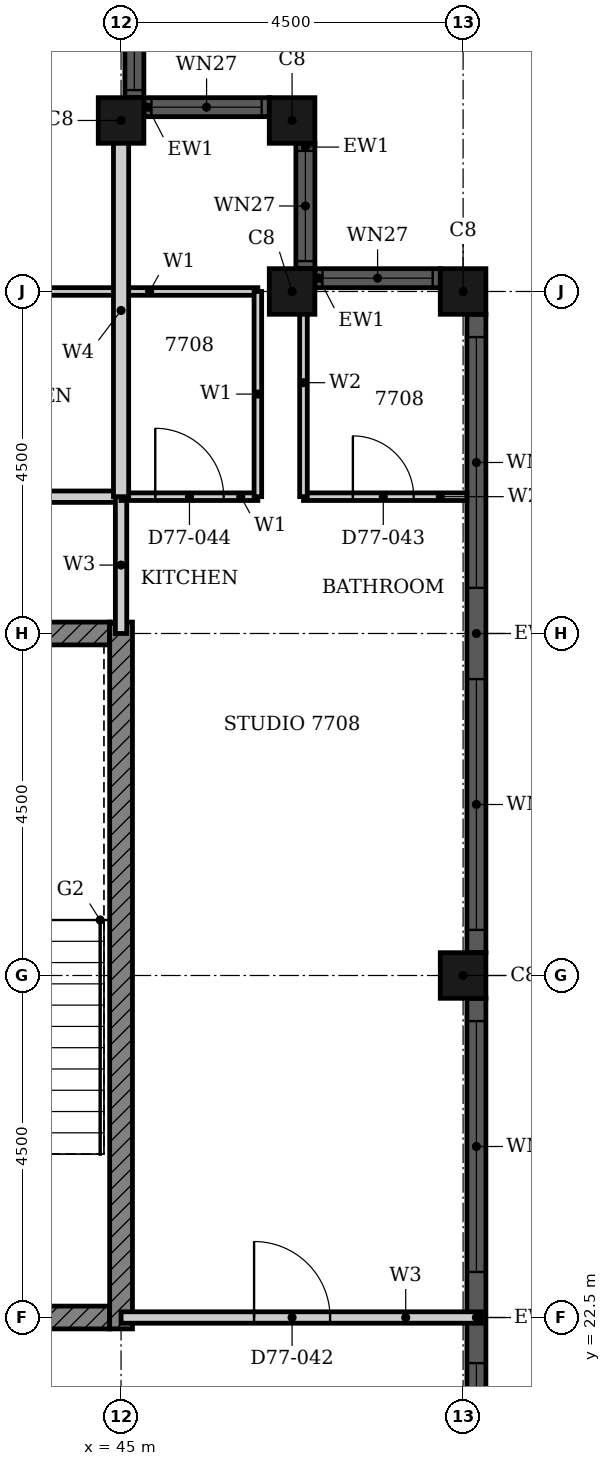
"""IFC4 building model, lengths in metres.
Left out: names, types, materials, properties, quantities, classifications, styles, units other than length and angle.
Written with IfcOpenShell. Run it as: python <this file> out.ifc"""

import sys

from ifc_helpers import new_model, si_unit, direction, frame, frame_2d, origin, origin_2d, place, context, subcontext, project, spatial, rectangle, hollow_rectangle, extrude, element, fill, save


model = new_model("IFC4")
c1 = context("Model", 3, precision=1e-05, world=origin(), true_north=direction((0.0, 1.0)))
c2 = subcontext(c1, "Body", "Model", "MODEL_VIEW")
j1 = project(units=[si_unit("LENGTHUNIT", "METRE"), si_unit("PLANEANGLEUNIT", "RADIAN")], contexts=[c1])
p1 = place(None, origin())
s1 = spatial("IfcSite", under=j1, at=p1, CompositionType="ELEMENT")
p2 = place(p1, origin())
s2 = spatial("IfcBuilding", under=s1, at=p2, CompositionType="ELEMENT")
p3 = place(p2, frame((0.0, 0.0, 301.9)))
s3 = spatial("IfcBuildingStorey", under=s2, at=p3, CompositionType="ELEMENT", Elevation=301.9)
for number, where, z_axis, x_axis in (
    (1, (49.5, 27.0, 0.0), (0.0, 0.0, 1.0), (1.0, 0.0, 0.0)),
    (2, (49.5, 36.0, 0.0), (0.0, 0.0, 1.0), (1.0, 0.0, 0.0)),
    (3, (47.25, 36.0, 0.0), (0.0, 0.0, 1.0), (1.0, 0.0, 0.0)),
    (4, (47.25, 38.25, 0.0), (0.0, 0.0, 1.0), (1.0, 0.0, 0.0)),
    (5, (45.0, 38.25, 0.0), (0.0, 0.0, 1.0), (1.0, 0.0, 0.0)),
):
    element("IfcColumn", number, at=place(p3, frame(where, z_axis=z_axis, x_axis=x_axis)), inside=s3, PredefinedType="COLUMN", context=c2, shape_type="SweptSolid", body=[
        extrude(hollow_rectangle(XDim=0.6, YDim=0.6, WallThickness=0.02, at=origin_2d()), origin(), (0.0, 0.0, 1.0), 3.7),
    ])
p4 = place(p3, frame((49.675, 18.3, 0.0), z_axis=(0.0, 0.0, 1.0), x_axis=(0.0, 1.0, 0.0)))
e6 = element("IfcWall", 6, at=p4, inside=s3, PredefinedType="SOLIDWALL", context=c2, shape_type="SweptSolid", body=[
    extrude(rectangle(XDim=8.4, YDim=0.25, at=frame_2d((4.2, 0.0))), origin(), (0.0, 0.0, 1.0), 3.7),
])
p5 = place(p4, frame((0.3, 0.0, 0.45)))
e7 = element("IfcOpeningElement", 7, at=p5, cuts=e6, PredefinedType="OPENING", context=c2, shape_type="SweptSolid", body=[
    extrude(rectangle(XDim=3.3, YDim=1.8, at=frame_2d((1.65, 0.9))), frame((0.0, 0.135, 0.0), z_axis=(0.0, -1.0, 0.0), x_axis=(1.0, 0.0, 0.0)), (0.0, 0.0, 1.0), 0.27),
])
p6 = place(p4, frame((4.8, 0.0, 0.45)))
e8 = element("IfcOpeningElement", 8, at=p6, cuts=e6, PredefinedType="OPENING", context=c2, shape_type="SweptSolid", body=[
    extrude(rectangle(XDim=3.3, YDim=1.8, at=frame_2d((1.65, 0.9))), frame((0.0, 0.135, 0.0), z_axis=(0.0, -1.0, 0.0), x_axis=(1.0, 0.0, 0.0)), (0.0, 0.0, 1.0), 0.27),
])
p7 = place(p3, frame((49.675, 27.3, 0.0), z_axis=(0.0, 0.0, 1.0), x_axis=(0.0, 1.0, 0.0)))
e9 = element("IfcWall", 9, at=p7, inside=s3, PredefinedType="SOLIDWALL", context=c2, shape_type="SweptSolid", body=[
    extrude(rectangle(XDim=8.4, YDim=0.25, at=frame_2d((4.2, 0.0))), origin(), (0.0, 0.0, 1.0), 3.7),
])
p8 = place(p7, frame((0.3, 0.0, 0.45)))
e10 = element("IfcOpeningElement", 10, at=p8, cuts=e9, PredefinedType="OPENING", context=c2, shape_type="SweptSolid", body=[
    extrude(rectangle(XDim=3.3, YDim=1.8, at=frame_2d((1.65, 0.9))), frame((0.0, 0.135, 0.0), z_axis=(0.0, -1.0, 0.0), x_axis=(1.0, 0.0, 0.0)), (0.0, 0.0, 1.0), 0.27),
])
p9 = place(p7, frame((4.8, 0.0, 0.45)))
e11 = element("IfcOpeningElement", 11, at=p9, cuts=e9, PredefinedType="OPENING", context=c2, shape_type="SweptSolid", body=[
    extrude(rectangle(XDim=3.3, YDim=1.8, at=frame_2d((1.65, 0.9))), frame((0.0, 0.135, 0.0), z_axis=(0.0, -1.0, 0.0), x_axis=(1.0, 0.0, 0.0)), (0.0, 0.0, 1.0), 0.27),
])
p10 = place(p3, frame((49.2, 36.175, 0.0), z_axis=(0.0, 0.0, 1.0), x_axis=(-1.0, 0.0, 0.0)))
e12 = element("IfcWall", 12, at=p10, inside=s3, PredefinedType="SOLIDWALL", context=c2, shape_type="SweptSolid", body=[
    extrude(rectangle(XDim=1.65, YDim=0.25, at=frame_2d((0.825, 0.0))), origin(), (0.0, 0.0, 1.0), 3.7),
])
p11 = place(p10, frame((0.1, 0.0, 0.9)))
e13 = element("IfcOpeningElement", 13, at=p11, cuts=e12, PredefinedType="OPENING", context=c2, shape_type="SweptSolid", body=[
    extrude(rectangle(XDim=1.45, YDim=1.35, at=frame_2d((0.725, 0.675))), frame((0.0, 0.135, 0.0), z_axis=(0.0, -1.0, 0.0), x_axis=(1.0, 0.0, 0.0)), (0.0, 0.0, 1.0), 0.27),
])
p12 = place(p3, frame((47.425, 36.3, 0.0), z_axis=(0.0, 0.0, 1.0), x_axis=(0.0, 1.0, 0.0)))
e14 = element("IfcWall", 14, at=p12, inside=s3, PredefinedType="SOLIDWALL", context=c2, shape_type="SweptSolid", body=[
    extrude(rectangle(XDim=1.65, YDim=0.25, at=frame_2d((0.825, 0.0))), origin(), (0.0, 0.0, 1.0), 3.7),
])
p13 = place(p12, frame((0.1, 0.0, 0.9)))
e15 = element("IfcOpeningElement", 15, at=p13, cuts=e14, PredefinedType="OPENING", context=c2, shape_type="SweptSolid", body=[
    extrude(rectangle(XDim=1.45, YDim=1.35, at=frame_2d((0.725, 0.675))), frame((0.0, 0.135, 0.0), z_axis=(0.0, -1.0, 0.0), x_axis=(1.0, 0.0, 0.0)), (0.0, 0.0, 1.0), 0.27),
])
p14 = place(p3, frame((46.95, 38.425, 0.0), z_axis=(0.0, 0.0, 1.0), x_axis=(-1.0, 0.0, 0.0)))
e16 = element("IfcWall", 16, at=p14, inside=s3, PredefinedType="SOLIDWALL", context=c2, shape_type="SweptSolid", body=[
    extrude(rectangle(XDim=1.65, YDim=0.25, at=frame_2d((0.825, 0.0))), origin(), (0.0, 0.0, 1.0), 3.7),
])
p15 = place(p14, frame((0.1, 0.0, 0.9)))
e17 = element("IfcOpeningElement", 17, at=p15, cuts=e16, PredefinedType="OPENING", context=c2, shape_type="SweptSolid", body=[
    extrude(rectangle(XDim=1.45, YDim=1.35, at=frame_2d((0.725, 0.675))), frame((0.0, 0.135, 0.0), z_axis=(0.0, -1.0, 0.0), x_axis=(1.0, 0.0, 0.0)), (0.0, 0.0, 1.0), 0.27),
])
p16 = place(p3, frame((45.175, 38.55, 0.0), z_axis=(0.0, 0.0, 1.0), x_axis=(0.0, 1.0, 0.0)))
e18 = element("IfcWall", 18, at=p16, inside=s3, PredefinedType="SOLIDWALL", context=c2, shape_type="SweptSolid", body=[
    extrude(rectangle(XDim=1.65, YDim=0.25, at=frame_2d((0.825, 0.0))), origin(), (0.0, 0.0, 1.0), 3.7),
])
p17 = place(p16, frame((0.1, 0.0, 0.9)))
e19 = element("IfcOpeningElement", 19, at=p17, cuts=e18, PredefinedType="OPENING", context=c2, shape_type="SweptSolid", body=[
    extrude(rectangle(XDim=1.45, YDim=1.35, at=frame_2d((0.725, 0.675))), frame((0.0, 0.135, 0.0), z_axis=(0.0, -1.0, 0.0), x_axis=(1.0, 0.0, 0.0)), (0.0, 0.0, 1.0), 0.27),
])
p18 = place(p3, frame((30.339, 22.5, 0.0), z_axis=(0.0, 0.0, 1.0), x_axis=(1.0, 0.0, 0.0)))
e20 = element("IfcWall", 20, at=p18, inside=s3, PredefinedType="SHEAR", context=c2, shape_type="SweptSolid", body=[
    extrude(rectangle(XDim=14.511, YDim=0.3, at=frame_2d((7.255, 0.0))), origin(), (0.0, 0.0, 1.0), 3.2),
])
p19 = place(p18, frame((7.975, 0.0, 0.0)))
e21 = element("IfcOpeningElement", 21, at=p19, cuts=e20, PredefinedType="OPENING", context=c2, shape_type="SweptSolid", body=[
    extrude(rectangle(XDim=1.8, YDim=2.1, at=frame_2d((0.9, 1.05))), frame((0.0, 0.16, 0.0), z_axis=(0.0, -1.0, 0.0), x_axis=(1.0, 0.0, 0.0)), (0.0, 0.0, 1.0), 0.32),
])
p20 = place(p3, frame((40.625, 31.5, 0.0), z_axis=(0.0, 0.0, 1.0), x_axis=(1.0, 0.0, 0.0)))
e22 = element("IfcWall", 22, at=p20, inside=s3, PredefinedType="SHEAR", context=c2, shape_type="SweptSolid", body=[
    extrude(rectangle(XDim=4.225, YDim=0.3, at=frame_2d((2.113, 0.0))), origin(), (0.0, 0.0, 1.0), 3.2),
])
p21 = place(p3, frame((45.0, 22.35, 0.0), z_axis=(0.0, 0.0, 1.0), x_axis=(0.0, 1.0, 0.0)))
e23 = element("IfcWall", 23, at=p21, inside=s3, PredefinedType="SHEAR", context=c2, shape_type="SweptSolid", body=[
    extrude(rectangle(XDim=9.3, YDim=0.3, at=frame_2d((4.65, 0.0))), origin(), (0.0, 0.0, 1.0), 3.2),
])
p22 = place(p3, frame((45.0, 22.5, 0.0), z_axis=(0.0, 0.0, 1.0), x_axis=(1.0, 0.0, 0.0)))
e24 = element("IfcWall", 24, at=p22, inside=s3, PredefinedType="PARTITIONING", context=c2, shape_type="SweptSolid", body=[
    extrude(rectangle(XDim=4.74, YDim=0.15, at=frame_2d((2.37, 0.0))), origin(), (0.0, 0.0, 1.0), 3.2),
])
p23 = place(p22, frame((1.75, 0.0, 0.0)))
e25 = element("IfcOpeningElement", 25, at=p23, cuts=e24, PredefinedType="OPENING", context=c2, shape_type="SweptSolid", body=[
    extrude(rectangle(XDim=1.0, YDim=2.2, at=frame_2d((0.5, 1.1))), frame((0.0, 0.085, 0.0), z_axis=(0.0, -1.0, 0.0), x_axis=(1.0, 0.0, 0.0)), (0.0, 0.0, 1.0), 0.17),
])
p24 = place(p3, frame((38.4, 33.3, 0.0), z_axis=(0.0, 0.0, 1.0), x_axis=(1.0, 0.0, 0.0)))
e26 = element("IfcWall", 26, at=p24, inside=s3, PredefinedType="PARTITIONING", context=c2, shape_type="SweptSolid", body=[
    extrude(rectangle(XDim=6.6, YDim=0.15, at=frame_2d((3.3, 0.0))), origin(), (0.0, 0.0, 1.0), 3.2),
])
p25 = place(p24, frame((1.3, 0.0, 0.0)))
e27 = element("IfcOpeningElement", 27, at=p25, cuts=e26, PredefinedType="OPENING", context=c2, shape_type="SweptSolid", body=[
    extrude(rectangle(XDim=1.0, YDim=2.2, at=frame_2d((0.5, 1.1))), frame((0.0, 0.085, 0.0), z_axis=(0.0, -1.0, 0.0), x_axis=(1.0, 0.0, 0.0)), (0.0, 0.0, 1.0), 0.17),
])
p26 = place(p3, frame((45.0, 31.5, 0.0), z_axis=(0.0, 0.0, 1.0), x_axis=(0.0, 1.0, 0.0)))
e28 = element("IfcWall", 28, at=p26, inside=s3, PredefinedType="PARTITIONING", context=c2, shape_type="SweptSolid", body=[
    extrude(rectangle(XDim=1.8, YDim=0.15, at=frame_2d((0.9, 0.0))), origin(), (0.0, 0.0, 1.0), 3.2),
])
p27 = place(p3, frame((45.0, 33.3, 0.0), z_axis=(0.0, 0.0, 1.0), x_axis=(1.0, 0.0, 0.0)))
e29 = element("IfcWall", 29, at=p27, inside=s3, PredefinedType="PARTITIONING", context=c2, shape_type="SweptSolid", body=[
    extrude(rectangle(XDim=1.8, YDim=0.1, at=frame_2d((0.9, 0.0))), origin(), (0.0, 0.0, 1.0), 3.2),
])
p28 = place(p27, frame((0.45, 0.0, 0.0)))
e30 = element("IfcOpeningElement", 30, at=p28, cuts=e29, PredefinedType="OPENING", context=c2, shape_type="SweptSolid", body=[
    extrude(rectangle(XDim=0.9, YDim=2.1, at=frame_2d((0.45, 1.05))), frame((0.0, 0.06, 0.0), z_axis=(0.0, -1.0, 0.0), x_axis=(1.0, 0.0, 0.0)), (0.0, 0.0, 1.0), 0.12),
])
p29 = place(p3, frame((42.0, 36.0, 0.0), z_axis=(0.0, 0.0, 1.0), x_axis=(1.0, 0.0, 0.0)))
e31 = element("IfcWall", 31, at=p29, inside=s3, PredefinedType="PARTITIONING", context=c2, shape_type="SweptSolid", body=[
    extrude(rectangle(XDim=4.8, YDim=0.1, at=frame_2d((2.4, 0.0))), origin(), (0.0, 0.0, 1.0), 3.2),
])
p30 = place(p29, frame((1.05, 0.0, 0.0)))
e32 = element("IfcOpeningElement", 32, at=p30, cuts=e31, PredefinedType="OPENING", context=c2, shape_type="SweptSolid", body=[
    extrude(rectangle(XDim=0.9, YDim=2.1, at=frame_2d((0.45, 1.05))), frame((0.0, 0.06, 0.0), z_axis=(0.0, -1.0, 0.0), x_axis=(1.0, 0.0, 0.0)), (0.0, 0.0, 1.0), 0.12),
])
p31 = place(p3, frame((46.8, 33.3, 0.0), z_axis=(0.0, 0.0, 1.0), x_axis=(0.0, 1.0, 0.0)))
e33 = element("IfcWall", 33, at=p31, inside=s3, PredefinedType="PARTITIONING", context=c2, shape_type="SweptSolid", body=[
    extrude(rectangle(XDim=2.7, YDim=0.1, at=frame_2d((1.35, 0.0))), origin(), (0.0, 0.0, 1.0), 3.2),
])
p32 = place(p3, frame((45.0, 33.3, 0.0), z_axis=(0.0, 0.0, 1.0), x_axis=(0.0, 1.0, 0.0)))
e34 = element("IfcWall", 34, at=p32, inside=s3, PredefinedType="PARTITIONING", context=c2, shape_type="SweptSolid", body=[
    extrude(rectangle(XDim=4.9, YDim=0.2, at=frame_2d((2.45, 0.0))), origin(), (0.0, 0.0, 1.0), 3.2),
])
p33 = place(p3, frame((47.4, 33.3, 0.0), z_axis=(0.0, 0.0, 1.0), x_axis=(1.0, 0.0, 0.0)))
e35 = element("IfcWall", 35, at=p33, inside=s3, PredefinedType="PARTITIONING", context=c2, shape_type="SweptSolid", body=[
    extrude(rectangle(XDim=2.15, YDim=0.1, at=frame_2d((1.075, 0.0))), origin(), (0.0, 0.0, 1.0), 3.2),
])
p34 = place(p33, frame((0.65, 0.0, 0.0)))
e36 = element("IfcOpeningElement", 36, at=p34, cuts=e35, PredefinedType="OPENING", context=c2, shape_type="SweptSolid", body=[
    extrude(rectangle(XDim=0.8, YDim=2.1, at=frame_2d((0.4, 1.05))), frame((0.0, 0.06, 0.0), z_axis=(0.0, -1.0, 0.0), x_axis=(1.0, 0.0, 0.0)), (0.0, 0.0, 1.0), 0.12),
])
p35 = place(p3, frame((47.4, 33.3, 0.0), z_axis=(0.0, 0.0, 1.0), x_axis=(0.0, 1.0, 0.0)))
e37 = element("IfcWall", 37, at=p35, inside=s3, PredefinedType="PARTITIONING", context=c2, shape_type="SweptSolid", body=[
    extrude(rectangle(XDim=3.0, YDim=0.1, at=frame_2d((1.5, 0.0))), origin(), (0.0, 0.0, 1.0), 3.2),
])
p36 = place(p5, origin())
e38 = element("IfcWindow", 38, at=p36, inside=s3, PartitioningType="SINGLE_PANEL", PredefinedType="WINDOW", context=c2, shape_type="SweptSolid", body=[
    extrude(rectangle(XDim=3.3, YDim=1.8, at=frame_2d((1.65, 0.9))), frame((0.0, 0.03, 0.0), z_axis=(0.0, -1.0, 0.0), x_axis=(1.0, 0.0, 0.0)), (0.0, 0.0, 1.0), 0.06),
])
fill(e7, e38)
p37 = place(p6, origin())
e39 = element("IfcWindow", 39, at=p37, inside=s3, PartitioningType="SINGLE_PANEL", PredefinedType="WINDOW", context=c2, shape_type="SweptSolid", body=[
    extrude(rectangle(XDim=3.3, YDim=1.8, at=frame_2d((1.65, 0.9))), frame((0.0, 0.03, 0.0), z_axis=(0.0, -1.0, 0.0), x_axis=(1.0, 0.0, 0.0)), (0.0, 0.0, 1.0), 0.06),
])
fill(e8, e39)
p38 = place(p8, origin())
e40 = element("IfcWindow", 40, at=p38, inside=s3, PartitioningType="SINGLE_PANEL", PredefinedType="WINDOW", context=c2, shape_type="SweptSolid", body=[
    extrude(rectangle(XDim=3.3, YDim=1.8, at=frame_2d((1.65, 0.9))), frame((0.0, 0.03, 0.0), z_axis=(0.0, -1.0, 0.0), x_axis=(1.0, 0.0, 0.0)), (0.0, 0.0, 1.0), 0.06),
])
fill(e10, e40)
p39 = place(p9, origin())
e41 = element("IfcWindow", 41, at=p39, inside=s3, PartitioningType="SINGLE_PANEL", PredefinedType="WINDOW", context=c2, shape_type="SweptSolid", body=[
    extrude(rectangle(XDim=3.3, YDim=1.8, at=frame_2d((1.65, 0.9))), frame((0.0, 0.03, 0.0), z_axis=(0.0, -1.0, 0.0), x_axis=(1.0, 0.0, 0.0)), (0.0, 0.0, 1.0), 0.06),
])
fill(e11, e41)
p40 = place(p11, origin())
e42 = element("IfcWindow", 42, at=p40, inside=s3, PartitioningType="SINGLE_PANEL", PredefinedType="WINDOW", context=c2, shape_type="SweptSolid", body=[
    extrude(rectangle(XDim=1.45, YDim=1.35, at=frame_2d((0.725, 0.675))), frame((0.0, 0.03, 0.0), z_axis=(0.0, -1.0, 0.0), x_axis=(1.0, 0.0, 0.0)), (0.0, 0.0, 1.0), 0.06),
])
fill(e13, e42)
p41 = place(p13, origin())
e43 = element("IfcWindow", 43, at=p41, inside=s3, PartitioningType="SINGLE_PANEL", PredefinedType="WINDOW", context=c2, shape_type="SweptSolid", body=[
    extrude(rectangle(XDim=1.45, YDim=1.35, at=frame_2d((0.725, 0.675))), frame((0.0, 0.03, 0.0), z_axis=(0.0, -1.0, 0.0), x_axis=(1.0, 0.0, 0.0)), (0.0, 0.0, 1.0), 0.06),
])
fill(e15, e43)
p42 = place(p15, origin())
e44 = element("IfcWindow", 44, at=p42, inside=s3, PartitioningType="SINGLE_PANEL", PredefinedType="WINDOW", context=c2, shape_type="SweptSolid", body=[
    extrude(rectangle(XDim=1.45, YDim=1.35, at=frame_2d((0.725, 0.675))), frame((0.0, 0.03, 0.0), z_axis=(0.0, -1.0, 0.0), x_axis=(1.0, 0.0, 0.0)), (0.0, 0.0, 1.0), 0.06),
])
fill(e17, e44)
p43 = place(p17, origin())
e45 = element("IfcWindow", 45, at=p43, inside=s3, PartitioningType="SINGLE_PANEL", PredefinedType="WINDOW", context=c2, shape_type="SweptSolid", body=[
    extrude(rectangle(XDim=1.45, YDim=1.35, at=frame_2d((0.725, 0.675))), frame((0.0, 0.03, 0.0), z_axis=(0.0, -1.0, 0.0), x_axis=(1.0, 0.0, 0.0)), (0.0, 0.0, 1.0), 0.06),
])
fill(e19, e45)
p44 = place(p23, origin())
e46 = element("IfcDoor", 46, at=p44, inside=s3, OperationType="SINGLE_SWING_LEFT", PredefinedType="DOOR", context=c2, shape_type="SweptSolid", body=[
    extrude(rectangle(XDim=1.0, YDim=2.2, at=frame_2d((0.5, 1.1))), frame((0.0, 0.025, 0.0), z_axis=(0.0, -1.0, 0.0), x_axis=(1.0, 0.0, 0.0)), (0.0, 0.0, 1.0), 0.05),
])
fill(e25, e46)
p45 = place(p34, origin())
e47 = element("IfcDoor", 47, at=p45, inside=s3, OperationType="SINGLE_SWING_RIGHT", PredefinedType="DOOR", context=c2, shape_type="SweptSolid", body=[
    extrude(rectangle(XDim=0.8, YDim=2.1, at=frame_2d((0.4, 1.05))), frame((0.0, 0.025, 0.0), z_axis=(0.0, -1.0, 0.0), x_axis=(1.0, 0.0, 0.0)), (0.0, 0.0, 1.0), 0.05),
])
fill(e36, e47)
p46 = place(p28, origin())
e48 = element("IfcDoor", 48, at=p46, inside=s3, OperationType="SINGLE_SWING_LEFT", PredefinedType="DOOR", context=c2, shape_type="SweptSolid", body=[
    extrude(rectangle(XDim=0.9, YDim=2.1, at=frame_2d((0.45, 1.05))), frame((0.0, 0.025, 0.0), z_axis=(0.0, -1.0, 0.0), x_axis=(1.0, 0.0, 0.0)), (0.0, 0.0, 1.0), 0.05),
])
fill(e30, e48)
save(model, sys.argv[1])
